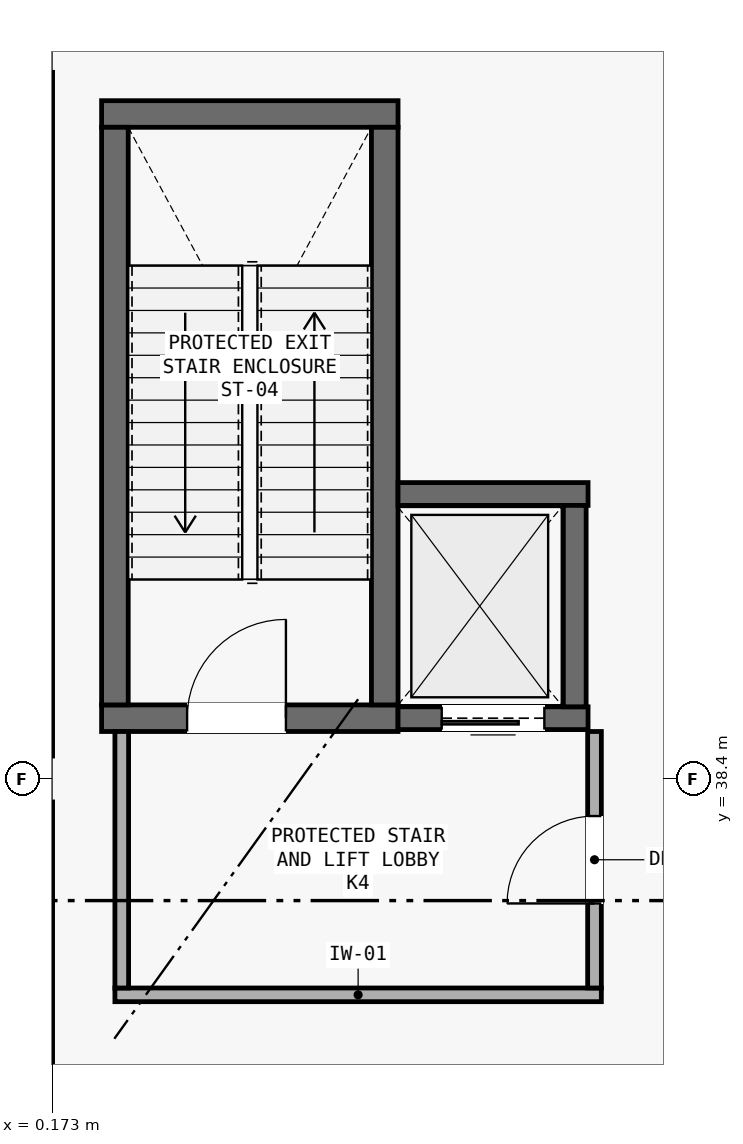
"""IFC4 building model, lengths in metres.
Left out: names, types, materials, properties, quantities, classifications, styles, units other than length and angle.
Written with IfcOpenShell. Run it as: python <this file> out.ifc"""

import sys

from ifc_helpers import new_model, si_unit, direction, frame, frame_2d, origin, place, context, subcontext, project, spatial, rectangle, extrude, element, fill, save


model = new_model("IFC4")
c1 = context("Model", 3, precision=1e-05, world=origin(), true_north=direction((0.0, 1.0)))
c2 = subcontext(c1, "Body", "Model", "MODEL_VIEW")
j1 = project(units=[si_unit("LENGTHUNIT", "METRE"), si_unit("PLANEANGLEUNIT", "RADIAN")], contexts=[c1])
p1 = place(None, origin())
s1 = spatial("IfcSite", under=j1, at=p1, CompositionType="ELEMENT")
p2 = place(p1, origin())
s2 = spatial("IfcBuilding", under=s1, at=p2, CompositionType="ELEMENT")
p3 = place(p2, origin())
s3 = spatial("IfcBuildingStorey", under=s2, at=p3, CompositionType="ELEMENT", Elevation=0.0)
p4 = place(p3, frame((0.0, 29.102, 0.0), z_axis=(0.0, 0.0, 1.0), x_axis=(0.0, 1.0, 0.0)))
e1 = element("IfcWall", 1, at=p4, inside=s3, PredefinedType="SOLIDWALL", context=c2, shape_type="SweptSolid", body=[
    extrude(rectangle(XDim=8.996, YDim=0.36, at=frame_2d((4.498, 0.0))), origin(), (0.0, 0.0, 1.0), 4.54),
])
p5 = place(p4, frame((3.498, 0.0, 0.0)))
e2 = element("IfcOpeningElement", 2, at=p5, cuts=e1, PredefinedType="OPENING", context=c2, shape_type="SweptSolid", body=[
    extrude(rectangle(XDim=2.0, YDim=2.25, at=frame_2d((1.0, 1.125))), frame((0.0, 0.19, 0.0), z_axis=(0.0, -1.0, 0.0), x_axis=(1.0, 0.0, 0.0)), (0.0, 0.0, 1.0), 0.38),
])
p6 = place(p3, frame((0.0, 38.702, 0.0), z_axis=(0.0, 0.0, 1.0), x_axis=(0.0, 1.0, 0.0)))
e3 = element("IfcWall", 3, at=p6, inside=s3, PredefinedType="SOLIDWALL", context=c2, shape_type="SweptSolid", body=[
    extrude(rectangle(XDim=8.996, YDim=0.36, at=frame_2d((4.498, 0.0))), origin(), (0.0, 0.0, 1.0), 4.54),
])
p7 = place(p6, frame((2.431, 0.0, 0.9)))
e4 = element("IfcOpeningElement", 4, at=p7, cuts=e3, PredefinedType="OPENING", context=c2, shape_type="SweptSolid", body=[
    extrude(rectangle(XDim=1.2, YDim=1.45, at=frame_2d((0.6, 0.725))), frame((0.0, 0.19, 0.0), z_axis=(0.0, -1.0, 0.0), x_axis=(1.0, 0.0, 0.0)), (0.0, 0.0, 1.0), 0.38),
])
p8 = place(p6, frame((5.365, 0.0, 0.9)))
e5 = element("IfcOpeningElement", 5, at=p8, cuts=e3, PredefinedType="OPENING", context=c2, shape_type="SweptSolid", body=[
    extrude(rectangle(XDim=1.2, YDim=1.45, at=frame_2d((0.6, 0.725))), frame((0.0, 0.19, 0.0), z_axis=(0.0, -1.0, 0.0), x_axis=(1.0, 0.0, 0.0)), (0.0, 0.0, 1.0), 0.38),
])
p9 = place(p3, frame((0.825, 39.2, 0.0), z_axis=(0.0, 0.0, 1.0), x_axis=(1.0, 0.0, 0.0)))
e6 = element("IfcWall", 6, at=p9, inside=s3, PredefinedType="SHEAR", context=c2, shape_type="SweptSolid", body=[
    extrude(rectangle(XDim=3.9, YDim=0.35, at=frame_2d((1.95, 0.0))), origin(), (0.0, 0.0, 1.0), 5.0),
])
p10 = place(p9, frame((1.125, 0.0, 0.0)))
e7 = element("IfcOpeningElement", 7, at=p10, cuts=e6, PredefinedType="OPENING", context=c2, shape_type="SweptSolid", body=[
    extrude(rectangle(XDim=1.3, YDim=2.15, at=frame_2d((0.65, 1.075))), frame((0.0, 0.185, 0.0), z_axis=(0.0, -1.0, 0.0), x_axis=(1.0, 0.0, 0.0)), (0.0, 0.0, 1.0), 0.37),
])
p11 = place(p3, frame((0.825, 47.15, 0.0), z_axis=(0.0, 0.0, 1.0), x_axis=(1.0, 0.0, 0.0)))
e8 = element("IfcWall", 8, at=p11, inside=s3, PredefinedType="SHEAR", context=c2, shape_type="SweptSolid", body=[
    extrude(rectangle(XDim=3.9, YDim=0.35, at=frame_2d((1.95, 0.0))), origin(), (0.0, 0.0, 1.0), 5.0),
])
for number, where, z_axis, x_axis in (
    (9, (1.0, 39.375, 0.0), (0.0, 0.0, 1.0), (0.0, 1.0, 0.0)),
    (10, (4.55, 39.375, 0.0), (0.0, 0.0, 1.0), (0.0, 1.0, 0.0)),
):
    element("IfcWall", number, at=place(p3, frame(where, z_axis=z_axis, x_axis=x_axis)), inside=s3, PredefinedType="SHEAR", context=c2, shape_type="SweptSolid", body=[
        extrude(rectangle(XDim=7.6, YDim=0.35, at=frame_2d((3.8, 0.0))), origin(), (0.0, 0.0, 1.0), 5.0),
    ])
p12 = place(p3, frame((4.725, 39.2, 0.0), z_axis=(0.0, 0.0, 1.0), x_axis=(1.0, 0.0, 0.0)))
e11 = element("IfcWall", 11, at=p12, inside=s3, PredefinedType="SHEAR", context=c2, shape_type="SweptSolid", body=[
    extrude(rectangle(XDim=2.5, YDim=0.3, at=frame_2d((1.25, 0.0))), origin(), (0.0, 0.0, 1.0), 5.0),
])
p13 = place(p12, frame((0.575, 0.0, 0.0)))
e12 = element("IfcOpeningElement", 12, at=p13, cuts=e11, PredefinedType="OPENING", context=c2, shape_type="SweptSolid", body=[
    extrude(rectangle(XDim=1.35, YDim=2.15, at=frame_2d((0.675, 1.075))), frame((0.0, 0.16, 0.0), z_axis=(0.0, -1.0, 0.0), x_axis=(1.0, 0.0, 0.0)), (0.0, 0.0, 1.0), 0.32),
])
p14 = place(p3, frame((4.725, 42.15, 0.0), z_axis=(0.0, 0.0, 1.0), x_axis=(1.0, 0.0, 0.0)))
e13 = element("IfcWall", 13, at=p14, inside=s3, PredefinedType="SHEAR", context=c2, shape_type="SweptSolid", body=[
    extrude(rectangle(XDim=2.5, YDim=0.3, at=frame_2d((1.25, 0.0))), origin(), (0.0, 0.0, 1.0), 5.0),
])
p15 = place(p3, frame((7.05, 39.35, 0.0), z_axis=(0.0, 0.0, 1.0), x_axis=(0.0, 1.0, 0.0)))
e14 = element("IfcWall", 14, at=p15, inside=s3, PredefinedType="SHEAR", context=c2, shape_type="SweptSolid", body=[
    extrude(rectangle(XDim=2.65, YDim=0.3, at=frame_2d((1.325, 0.0))), origin(), (0.0, 0.0, 1.0), 5.0),
])
p16 = place(p3, frame((1.0, 35.56, 0.0), z_axis=(0.0, 0.0, 1.0), x_axis=(1.0, 0.0, 0.0)))
e15 = element("IfcWall", 15, at=p16, inside=s3, PredefinedType="PARTITIONING", context=c2, shape_type="SweptSolid", body=[
    extrude(rectangle(XDim=6.4, YDim=0.18, at=frame_2d((3.2, 0.0))), origin(), (0.0, 0.0, 1.0), 5.0),
])
p17 = place(p3, frame((1.09, 35.65, 0.0), z_axis=(0.0, 0.0, 1.0), x_axis=(0.0, 1.0, 0.0)))
e16 = element("IfcWall", 16, at=p17, inside=s3, PredefinedType="PARTITIONING", context=c2, shape_type="SweptSolid", body=[
    extrude(rectangle(XDim=3.375, YDim=0.18, at=frame_2d((1.688, 0.0))), origin(), (0.0, 0.0, 1.0), 5.0),
])
p18 = place(p3, frame((7.31, 35.65, 0.0), z_axis=(0.0, 0.0, 1.0), x_axis=(0.0, 1.0, 0.0)))
e17 = element("IfcWall", 17, at=p18, inside=s3, PredefinedType="PARTITIONING", context=c2, shape_type="SweptSolid", body=[
    extrude(rectangle(XDim=3.375, YDim=0.18, at=frame_2d((1.688, 0.0))), origin(), (0.0, 0.0, 1.0), 5.0),
])
p19 = place(p18, frame((1.113, 0.0, 0.0)))
e18 = element("IfcOpeningElement", 18, at=p19, cuts=e17, PredefinedType="OPENING", context=c2, shape_type="SweptSolid", body=[
    extrude(rectangle(XDim=1.15, YDim=2.15, at=frame_2d((0.575, 1.075))), frame((0.0, 0.1, 0.0), z_axis=(0.0, -1.0, 0.0), x_axis=(1.0, 0.0, 0.0)), (0.0, 0.0, 1.0), 0.2),
])
p20 = place(p10, origin())
e19 = element("IfcDoor", 19, at=p20, inside=s3, OperationType="SINGLE_SWING_RIGHT", PredefinedType="DOOR", context=c2, shape_type="SweptSolid", body=[
    extrude(rectangle(XDim=1.3, YDim=2.15, at=frame_2d((0.65, 1.075))), frame((0.0, 0.025, 0.0), z_axis=(0.0, -1.0, 0.0), x_axis=(1.0, 0.0, 0.0)), (0.0, 0.0, 1.0), 0.05),
])
fill(e7, e19)
p21 = place(p13, frame((1.35, 0.0, 0.0), z_axis=(0.0, 0.0, 1.0), x_axis=(-1.0, 0.0, 0.0)))
e20 = element("IfcDoor", 20, at=p21, inside=s3, OperationType="SLIDING_TO_RIGHT", PredefinedType="DOOR", context=c2, shape_type="SweptSolid", body=[
    extrude(rectangle(XDim=1.35, YDim=2.15, at=frame_2d((0.675, 1.075))), frame((0.0, 0.025, 0.0), z_axis=(0.0, -1.0, 0.0), x_axis=(1.0, 0.0, 0.0)), (0.0, 0.0, 1.0), 0.05),
])
fill(e12, e20)
p22 = place(p19, origin())
e21 = element("IfcDoor", 21, at=p22, inside=s3, OperationType="SINGLE_SWING_LEFT", PredefinedType="DOOR", context=c2, shape_type="SweptSolid", body=[
    extrude(rectangle(XDim=1.15, YDim=2.15, at=frame_2d((0.575, 1.075))), frame((0.0, 0.025, 0.0), z_axis=(0.0, -1.0, 0.0), x_axis=(1.0, 0.0, 0.0)), (0.0, 0.0, 1.0), 0.05),
])
fill(e18, e21)
save(model, sys.argv[1])
